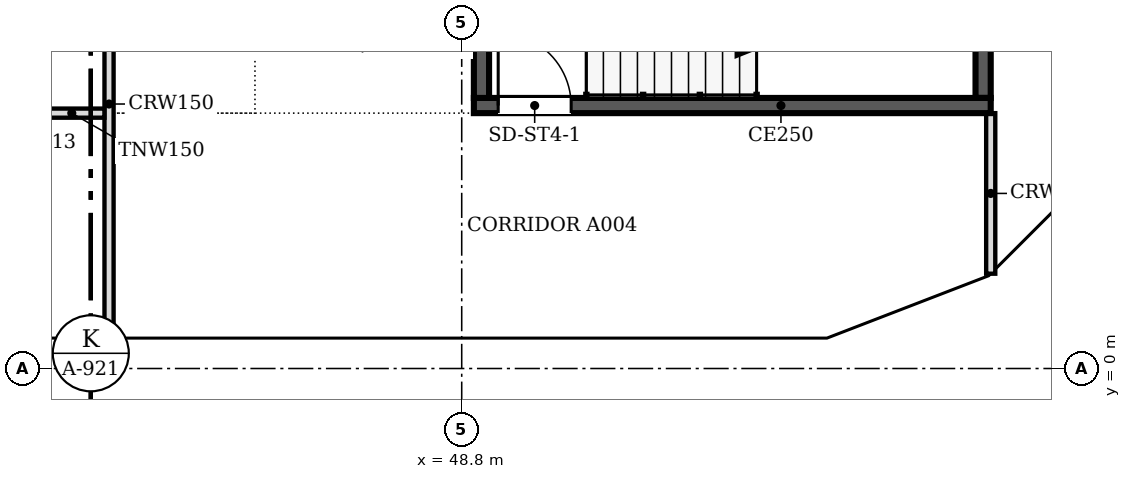
"""IFC4 building model, lengths in metres.
Left out: names, types, materials, properties, quantities, classifications, styles, units other than length and angle.
Written with IfcOpenShell. Run it as: python <this file> out.ifc"""

import sys

from ifc_helpers import new_model, si_unit, direction, frame, frame_2d, origin, place, context, subcontext, project, spatial, polyline, rectangle, outline, extrude, faceted_brep, source, transform, mapped, element, fill, save


model = new_model("IFC4")
c1 = context("Model", 3, precision=1e-05, world=origin(), true_north=direction((0.0, 1.0)))
c2 = subcontext(c1, "Body", "Model", "MODEL_VIEW")
j1 = project(units=[si_unit("LENGTHUNIT", "METRE"), si_unit("PLANEANGLEUNIT", "RADIAN")], contexts=[c1])
p1 = place(None, origin())
s1 = spatial("IfcSite", under=j1, at=p1, CompositionType="ELEMENT")
p2 = place(p1, origin())
s2 = spatial("IfcBuilding", under=s1, at=p2, CompositionType="ELEMENT")
p3 = place(p2, frame((0.0, 0.0, 159.2)))
s3 = spatial("IfcBuildingStorey", under=s2, at=p3, CompositionType="ELEMENT", Elevation=159.2)
m1 = source(origin(), c2, "Body", "Brep", [
    faceted_brep([(3.05, -0.25, 0.0), (6.1, -0.25, 3.8), (6.1, -0.25, 3.8), (3.05, -0.25, 7.6), (0.0, -0.25, 3.8), (0.0, 0.25, 3.8), (3.05, 0.25, 7.6), (6.1, 0.25, 3.8), (6.1, 0.25, 3.8), (3.05, 0.25, 0.0)], [[[0, 1, 2, 3, 4]], [[5, 6, 7, 8, 9]], [[9, 8, 1, 0]], [[7, 6, 3, 2]], [[6, 5, 4, 3]], [[5, 9, 0, 4]], [[1, 8, 7, 2]]]),
])
p4 = place(p3, frame((36.6, 0.25, -3.8), z_axis=(0.0, 0.0, 1.0), x_axis=(1.0, 0.0, 0.0)))
e1 = element("IfcWall", 1, at=p4, inside=s3, PredefinedType="SOLIDWALL", context=c2, shape_type="MappedRepresentation", body=[
    mapped(m1, transform((0.0, 0.0, 0.0), scale=1.0)),
])
m2 = source(origin(), c2, "Body", "SweptSolid", [
    extrude(outline(polyline([(3.05, 0.399), (5.78, 3.8), (3.05, 7.201), (0.321, 3.8), (3.05, 0.399)])), frame((0.0, 0.26, 0.0), z_axis=(0.0, -1.0, 0.0), x_axis=(1.0, 0.0, 0.0)), (0.0, 0.0, 1.0), 0.52),
])
p5 = place(p4, origin())
e2 = element("IfcOpeningElement", 2, at=p5, cuts=e1, PredefinedType="OPENING", context=c2, shape_type="MappedRepresentation", body=[
    mapped(m2, transform((0.0, 0.0, 0.0), scale=1.0)),
])
m3 = source(origin(), c2, "Body", "SweptSolid", [
    extrude(outline(polyline([(3.05, 0.0), (6.1, 3.8), (3.05, 7.6), (0.0, 3.8), (3.05, 0.0)])), frame((0.0, 0.25, 0.0), z_axis=(0.0, -1.0, 0.0), x_axis=(1.0, 0.0, 0.0)), (0.0, 0.0, 1.0), 0.5),
])
p6 = place(p3, frame((42.7, 0.25, -3.8), z_axis=(0.0, 0.0, 1.0), x_axis=(1.0, 0.0, 0.0)))
e3 = element("IfcWall", 3, at=p6, inside=s3, PredefinedType="SOLIDWALL", context=c2, shape_type="MappedRepresentation", body=[
    mapped(m3, transform((0.0, 0.0, 0.0), scale=1.0)),
])
p7 = place(p6, origin())
e4 = element("IfcOpeningElement", 4, at=p7, cuts=e3, PredefinedType="OPENING", context=c2, shape_type="MappedRepresentation", body=[
    mapped(m2, transform((0.0, 0.0, 0.0), scale=1.0)),
])
m4 = source(origin(), c2, "Body", "Brep", [
    faceted_brep([(3.05, -0.25, 0.0), (6.053, -0.25, 3.8), (3.05, -0.25, 7.6), (0.0, -0.25, 3.8), (0.0, 0.25, 3.8), (3.05, 0.25, 7.6), (6.007, 0.25, 3.859), (6.007, 0.25, 3.741), (3.05, 0.25, 0.0), (6.053, 0.0, 3.8)], [[[0, 1, 2, 3]], [[4, 5, 6, 7, 8]], [[8, 7, 9, 1, 0]], [[6, 5, 2, 1, 9]], [[5, 4, 3, 2]], [[4, 8, 0, 3]], [[9, 7, 6]]]),
])
p8 = place(p3, frame((48.8, 0.25, -3.8), z_axis=(0.0, 0.0, 1.0), x_axis=(1.0, 0.0, 0.0)))
e5 = element("IfcWall", 5, at=p8, inside=s3, PredefinedType="SOLIDWALL", context=c2, shape_type="MappedRepresentation", body=[
    mapped(m4, transform((0.0, 0.0, 0.0), scale=1.0)),
])
m5 = source(origin(), c2, "Body", "SweptSolid", [
    extrude(outline(polyline([(3.049, 0.401), (5.735, 3.8), (3.049, 7.199), (0.321, 3.8), (3.049, 0.401)])), frame((0.0, 0.26, 0.0), z_axis=(0.0, -1.0, 0.0), x_axis=(1.0, 0.0, 0.0)), (0.0, 0.0, 1.0), 0.52),
])
p9 = place(p8, origin())
e6 = element("IfcOpeningElement", 6, at=p9, cuts=e5, PredefinedType="OPENING", context=c2, shape_type="MappedRepresentation", body=[
    mapped(m5, transform((0.0, 0.0, 0.0), scale=1.0)),
])
m6 = source(origin(), c2, "Body", "Brep", [
    faceted_brep([(2.95, -0.25, 0.0), (3.003, -0.25, 0.068), (3.003, -0.25, 7.532), (2.95, -0.25, 7.6), (0.0, -0.25, 3.8), (0.047, 0.25, 3.86), (2.898, 0.25, 7.532), (2.898, 0.25, 0.068), (0.047, 0.25, 3.74), (2.95, 0.0, 0.0), (2.95, 0.0, 7.6), (0.0, 0.0, 3.8)], [[[0, 1, 2, 3, 4]], [[5, 6, 7, 8]], [[1, 0, 9]], [[10, 3, 2]], [[6, 5, 11, 4, 3, 10]], [[8, 7, 9, 0, 4, 11]], [[8, 11, 5]], [[1, 9, 7, 6, 10, 2]]]),
])
p10 = place(p3, frame((54.854, 0.25, -3.8), z_axis=(0.0, 0.0, 1.0), x_axis=(0.932970071518, 0.359953949349, 0.0)))
e7 = element("IfcWall", 7, at=p10, inside=s3, PredefinedType="SOLIDWALL", context=c2, shape_type="MappedRepresentation", body=[
    mapped(m6, transform((0.0, 0.0, 0.0), scale=1.0)),
])
m7 = source(origin(), c2, "Body", "SweptSolid", [
    extrude(outline(polyline([(2.75, 6.935), (0.316, 3.8), (2.75, 0.665), (2.75, 6.935)])), frame((0.0, 0.26, 0.0), z_axis=(0.0, -1.0, 0.0), x_axis=(1.0, 0.0, 0.0)), (0.0, 0.0, 1.0), 0.52),
])
p11 = place(p10, origin())
e8 = element("IfcOpeningElement", 8, at=p11, cuts=e7, PredefinedType="OPENING", context=c2, shape_type="MappedRepresentation", body=[
    mapped(m7, transform((0.0, 0.0, 0.0), scale=1.0)),
])
m8 = source(origin(), c2, "Body", "Brep", [
    faceted_brep([(0.053, -0.25, 0.0), (2.997, -0.25, 3.8), (0.053, -0.25, 7.6), (0.0, -0.25, 7.532), (0.0, -0.25, 0.068), (0.106, 0.25, 7.532), (2.944, 0.25, 3.868), (2.944, 0.25, 3.732), (0.106, 0.25, 0.068), (2.997, 0.0, 3.8), (0.053, 0.0, 0.0), (0.053, 0.0, 7.6)], [[[0, 1, 2, 3, 4]], [[5, 6, 7, 8]], [[8, 7, 9, 1, 0, 10]], [[6, 5, 11, 2, 1, 9]], [[3, 2, 11]], [[10, 0, 4]], [[8, 10, 4, 3, 11, 5]], [[9, 7, 6]]]),
])
p12 = place(p3, frame((57.569, 1.274, -3.8), z_axis=(0.0, 0.0, 1.0), x_axis=(0.707066050402, 0.707147509625, 0.0)))
e9 = element("IfcWall", 9, at=p12, inside=s3, PredefinedType="SOLIDWALL", context=c2, shape_type="MappedRepresentation", body=[
    mapped(m8, transform((0.0, 0.0, 0.0), scale=1.0)),
])
m9 = source(origin(), c2, "Body", "SweptSolid", [
    extrude(outline(polyline([(0.253, 0.667), (2.681, 3.8), (0.253, 6.934), (0.253, 0.667)])), frame((0.0, 0.26, 0.0), z_axis=(0.0, -1.0, 0.0), x_axis=(1.0, 0.0, 0.0)), (0.0, 0.0, 1.0), 0.52),
])
p13 = place(p12, origin())
e10 = element("IfcOpeningElement", 10, at=p13, cuts=e9, PredefinedType="OPENING", context=c2, shape_type="MappedRepresentation", body=[
    mapped(m9, transform((0.0, 0.0, 0.0), scale=1.0)),
])
p14 = place(p2, frame((0.0, 0.0, 163.0)))
s4 = spatial("IfcBuildingStorey", under=s2, at=p14, CompositionType="ELEMENT", Elevation=163.0)
p15 = place(p14, frame((39.65, 0.25, -3.8), z_axis=(0.0, 0.0, 1.0), x_axis=(1.0, 0.0, 0.0)))
e11 = element("IfcWall", 11, at=p15, inside=s4, PredefinedType="SOLIDWALL", context=c2, shape_type="MappedRepresentation", body=[
    mapped(m3, transform((0.0, 0.0, 0.0), scale=1.0)),
])
p16 = place(p15, origin())
e12 = element("IfcOpeningElement", 12, at=p16, cuts=e11, PredefinedType="OPENING", context=c2, shape_type="MappedRepresentation", body=[
    mapped(m2, transform((0.0, 0.0, 0.0), scale=1.0)),
])
p17 = place(p14, frame((45.75, 0.25, -3.8), z_axis=(0.0, 0.0, 1.0), x_axis=(1.0, 0.0, 0.0)))
e13 = element("IfcWall", 13, at=p17, inside=s4, PredefinedType="SOLIDWALL", context=c2, shape_type="MappedRepresentation", body=[
    mapped(m3, transform((0.0, 0.0, 0.0), scale=1.0)),
])
p18 = place(p17, origin())
e14 = element("IfcOpeningElement", 14, at=p18, cuts=e13, PredefinedType="OPENING", context=c2, shape_type="MappedRepresentation", body=[
    mapped(m2, transform((0.0, 0.0, 0.0), scale=1.0)),
])
m10 = source(origin(), c2, "Body", "Brep", [
    faceted_brep([(3.003, -0.25, 0.0), (3.05, -0.25, 0.06), (3.05, -0.25, 7.54), (3.003, -0.25, 7.6), (0.0, -0.25, 3.8), (0.0, 0.25, 3.8), (2.957, 0.25, 7.541), (2.957, 0.25, 0.059), (3.003, 0.0, 0.0), (3.003, 0.0, 7.6)], [[[0, 1, 2, 3, 4]], [[5, 6, 7]], [[1, 0, 8]], [[9, 3, 2]], [[6, 5, 4, 3, 9]], [[5, 7, 8, 0, 4]], [[1, 8, 7, 6, 9, 2]]]),
])
p19 = place(p14, frame((51.85, 0.25, -3.8), z_axis=(0.0, 0.0, 1.0), x_axis=(1.0, 0.0, 0.0)))
e15 = element("IfcWall", 15, at=p19, inside=s4, PredefinedType="SOLIDWALL", context=c2, shape_type="MappedRepresentation", body=[
    mapped(m10, transform((0.0, 0.0, 0.0), scale=1.0)),
])
m11 = source(origin(), c2, "Body", "SweptSolid", [
    extrude(outline(polyline([(2.803, 6.944), (0.319, 3.8), (2.803, 0.656), (2.803, 6.944)])), frame((0.0, 0.26, 0.0), z_axis=(0.0, -1.0, 0.0), x_axis=(1.0, 0.0, 0.0)), (0.0, 0.0, 1.0), 0.52),
])
p20 = place(p19, origin())
e16 = element("IfcOpeningElement", 16, at=p20, cuts=e15, PredefinedType="OPENING", context=c2, shape_type="MappedRepresentation", body=[
    mapped(m11, transform((0.0, 0.0, 0.0), scale=1.0)),
])
m12 = source(origin(), c2, "Body", "Brep", [
    faceted_brep([(0.047, -0.25, 0.0), (2.997, -0.25, 3.8), (0.047, -0.25, 7.6), (0.0, -0.25, 7.541), (0.0, -0.25, 0.059), (0.093, 0.25, 7.54), (2.944, 0.25, 3.868), (2.944, 0.25, 3.732), (0.093, 0.25, 0.06), (2.997, 0.0, 3.8), (0.047, 0.0, 0.0), (0.047, 0.0, 7.6)], [[[0, 1, 2, 3, 4]], [[5, 6, 7, 8]], [[8, 7, 9, 1, 0, 10]], [[6, 5, 11, 2, 1, 9]], [[3, 2, 11]], [[10, 0, 4]], [[8, 10, 4, 3, 11, 5]], [[9, 7, 6]]]),
])
p21 = place(p14, frame((54.81, 0.233, -3.8), z_axis=(0.0, 0.0, 1.0), x_axis=(0.932990326376, 0.359901446078, 0.0)))
e17 = element("IfcWall", 17, at=p21, inside=s4, PredefinedType="SOLIDWALL", context=c2, shape_type="MappedRepresentation", body=[
    mapped(m12, transform((0.0, 0.0, 0.0), scale=1.0)),
])
m13 = source(origin(), c2, "Body", "SweptSolid", [
    extrude(outline(polyline([(0.247, 0.665), (2.681, 3.8), (0.247, 6.935), (0.247, 0.665)])), frame((0.0, 0.26, 0.0), z_axis=(0.0, -1.0, 0.0), x_axis=(1.0, 0.0, 0.0)), (0.0, 0.0, 1.0), 0.52),
])
p22 = place(p21, origin())
e18 = element("IfcOpeningElement", 18, at=p22, cuts=e17, PredefinedType="OPENING", context=c2, shape_type="MappedRepresentation", body=[
    mapped(m13, transform((0.0, 0.0, 0.0), scale=1.0)),
])
m14 = source(origin(), c2, "Body", "Brep", [
    faceted_brep([(2.944, -0.25, 0.0), (2.997, -0.25, 0.068), (2.997, -0.25, 7.532), (2.944, -0.25, 7.6), (0.0, -0.25, 3.8), (0.053, 0.25, 3.868), (2.891, 0.25, 7.532), (2.891, 0.25, 0.068), (0.053, 0.25, 3.732), (2.944, 0.0, 0.0), (2.944, 0.0, 7.6), (0.0, 0.0, 3.8)], [[[0, 1, 2, 3, 4]], [[5, 6, 7, 8]], [[1, 0, 9]], [[10, 3, 2]], [[6, 5, 11, 4, 3, 10]], [[8, 7, 9, 0, 4, 11]], [[8, 11, 5]], [[1, 9, 7, 6, 10, 2]]]),
])
p23 = place(p14, frame((57.606, 1.312, -3.8), z_axis=(0.0, 0.0, 1.0), x_axis=(0.707147509625, 0.707066050402, 0.0)))
e19 = element("IfcWall", 19, at=p23, inside=s4, PredefinedType="SOLIDWALL", context=c2, shape_type="MappedRepresentation", body=[
    mapped(m14, transform((0.0, 0.0, 0.0), scale=1.0)),
])
m15 = source(origin(), c2, "Body", "SweptSolid", [
    extrude(outline(polyline([(2.744, 6.934), (0.316, 3.8), (2.744, 0.666), (2.744, 6.934)])), frame((0.0, 0.26, 0.0), z_axis=(0.0, -1.0, 0.0), x_axis=(1.0, 0.0, 0.0)), (0.0, 0.0, 1.0), 0.52),
])
p24 = place(p23, origin())
e20 = element("IfcOpeningElement", 20, at=p24, cuts=e19, PredefinedType="OPENING", context=c2, shape_type="MappedRepresentation", body=[
    mapped(m15, transform((0.0, 0.0, 0.0), scale=1.0)),
])
p25 = place(p3, frame((57.5, 4.325, 0.0), z_axis=(0.0, 0.0, 1.0), x_axis=(-1.0, 0.0, 0.0)))
e21 = element("IfcWall", 21, at=p25, inside=s3, PredefinedType="SOLIDWALL", context=c2, shape_type="SweptSolid", body=[
    extrude(rectangle(XDim=8.5, YDim=0.25, at=frame_2d((4.25, 0.0))), origin(), (0.0, 0.0, 1.0), 3.8),
])
m16 = source(origin(), c2, "Body", "SweptSolid", [
    extrude(rectangle(XDim=1.2, YDim=2.1, at=frame_2d((0.6, 1.05))), frame((0.0, 0.135, 0.0), z_axis=(0.0, -1.0, 0.0), x_axis=(1.0, 0.0, 0.0)), (0.0, 0.0, 1.0), 0.27),
])
p26 = place(p25, frame((6.9, 0.0, 0.0)))
e22 = element("IfcOpeningElement", 22, at=p26, cuts=e21, PredefinedType="OPENING", context=c2, shape_type="MappedRepresentation", body=[
    mapped(m16, transform((0.0, 0.0, 0.0), scale=1.0)),
])
for number, where, z_axis, x_axis in (
    (23, (49.125, 4.45, 0.0), (0.0, 0.0, 1.0), (0.0, 1.0, 0.0)),
    (24, (57.375, 7.85, 0.0), (0.0, 0.0, 1.0), (0.0, -1.0, 0.0)),
):
    element("IfcWall", number, at=place(p3, frame(where, z_axis=z_axis, x_axis=x_axis)), inside=s3, PredefinedType="SOLIDWALL", context=c2, shape_type="SweptSolid", body=[
        extrude(rectangle(XDim=3.4, YDim=0.25, at=frame_2d((1.7, 0.0))), origin(), (0.0, 0.0, 1.0), 3.8),
    ])
p27 = place(p3, frame((43.0, 0.5, 0.0), z_axis=(0.0, 0.0, 1.0), x_axis=(0.0, 1.0, 0.0)))
e25 = element("IfcWall", 25, at=p27, inside=s3, PredefinedType="PARTITIONING", context=c2, shape_type="SweptSolid", body=[
    extrude(rectangle(XDim=21.424, YDim=0.15, at=frame_2d((10.712, 0.0))), origin(), (0.0, 0.0, 1.0), 3.067),
])
m17 = source(origin(), c2, "Body", "SweptSolid", [
    extrude(rectangle(XDim=1.0, YDim=2.1, at=frame_2d((0.5, 1.05))), frame((0.0, 0.085, 0.0), z_axis=(0.0, -1.0, 0.0), x_axis=(1.0, 0.0, 0.0)), (0.0, 0.0, 1.0), 0.17),
])
p28 = place(p27, frame((15.001, 0.0, 0.0)))
e26 = element("IfcOpeningElement", 26, at=p28, cuts=e25, PredefinedType="OPENING", context=c2, shape_type="MappedRepresentation", body=[
    mapped(m17, transform((0.0, 0.0, 0.0), scale=1.0)),
])
p29 = place(p27, frame((7.7, 0.0, 0.0)))
e27 = element("IfcOpeningElement", 27, at=p29, cuts=e25, PredefinedType="OPENING", context=c2, shape_type="MappedRepresentation", body=[
    mapped(m17, transform((0.0, 0.0, 0.0), scale=1.0)),
])
p30 = place(p3, frame((57.5, 1.559, 0.0), z_axis=(0.0, 0.0, 1.0), x_axis=(0.0, 1.0, 0.0)))
e28 = element("IfcWall", 28, at=p30, inside=s3, PredefinedType="PARTITIONING", context=c2, shape_type="SweptSolid", body=[
    extrude(rectangle(XDim=2.641, YDim=0.15, at=frame_2d((1.32, 0.0))), origin(), (0.0, 0.0, 1.0), 3.067),
])
p31 = place(p3, frame((42.924, 4.2, 0.0), z_axis=(0.0, 0.0, 1.0), x_axis=(-1.0, 0.0, 0.0)))
e29 = element("IfcWall", 29, at=p31, inside=s3, PredefinedType="PARTITIONING", context=c2, shape_type="SweptSolid", body=[
    extrude(rectangle(XDim=2.973, YDim=0.15, at=frame_2d((1.487, 0.0))), origin(), (0.0, 0.0, 1.0), 3.067),
])
m18 = source(origin(), c2, "Body", "SweptSolid", [
    extrude(rectangle(XDim=0.9, YDim=2.1, at=frame_2d((0.45, 1.05))), frame((0.0, 0.085, 0.0), z_axis=(0.0, -1.0, 0.0), x_axis=(1.0, 0.0, 0.0)), (0.0, 0.0, 1.0), 0.17),
])
p32 = place(p31, frame((1.073, 0.0, 0.0)))
e30 = element("IfcOpeningElement", 30, at=p32, cuts=e29, PredefinedType="OPENING", context=c2, shape_type="MappedRepresentation", body=[
    mapped(m18, transform((0.0, 0.0, 0.0), scale=1.0)),
])
m19 = source(origin(), c2, "Body", "SweptSolid", [
    extrude(rectangle(XDim=1.2, YDim=2.1, at=frame_2d((0.6, 1.05))), frame((0.0, 0.025, 0.0), z_axis=(0.0, -1.0, 0.0), x_axis=(1.0, 0.0, 0.0)), (0.0, 0.0, 1.0), 0.05),
])
p33 = place(p26, origin())
e31 = element("IfcDoor", 31, at=p33, inside=s3, OperationType="SINGLE_SWING_RIGHT", PredefinedType="DOOR", context=c2, shape_type="MappedRepresentation", body=[
    mapped(m19, transform((0.0, 0.0, 0.0), scale=1.0)),
])
fill(e22, e31)
save(model, sys.argv[1])
